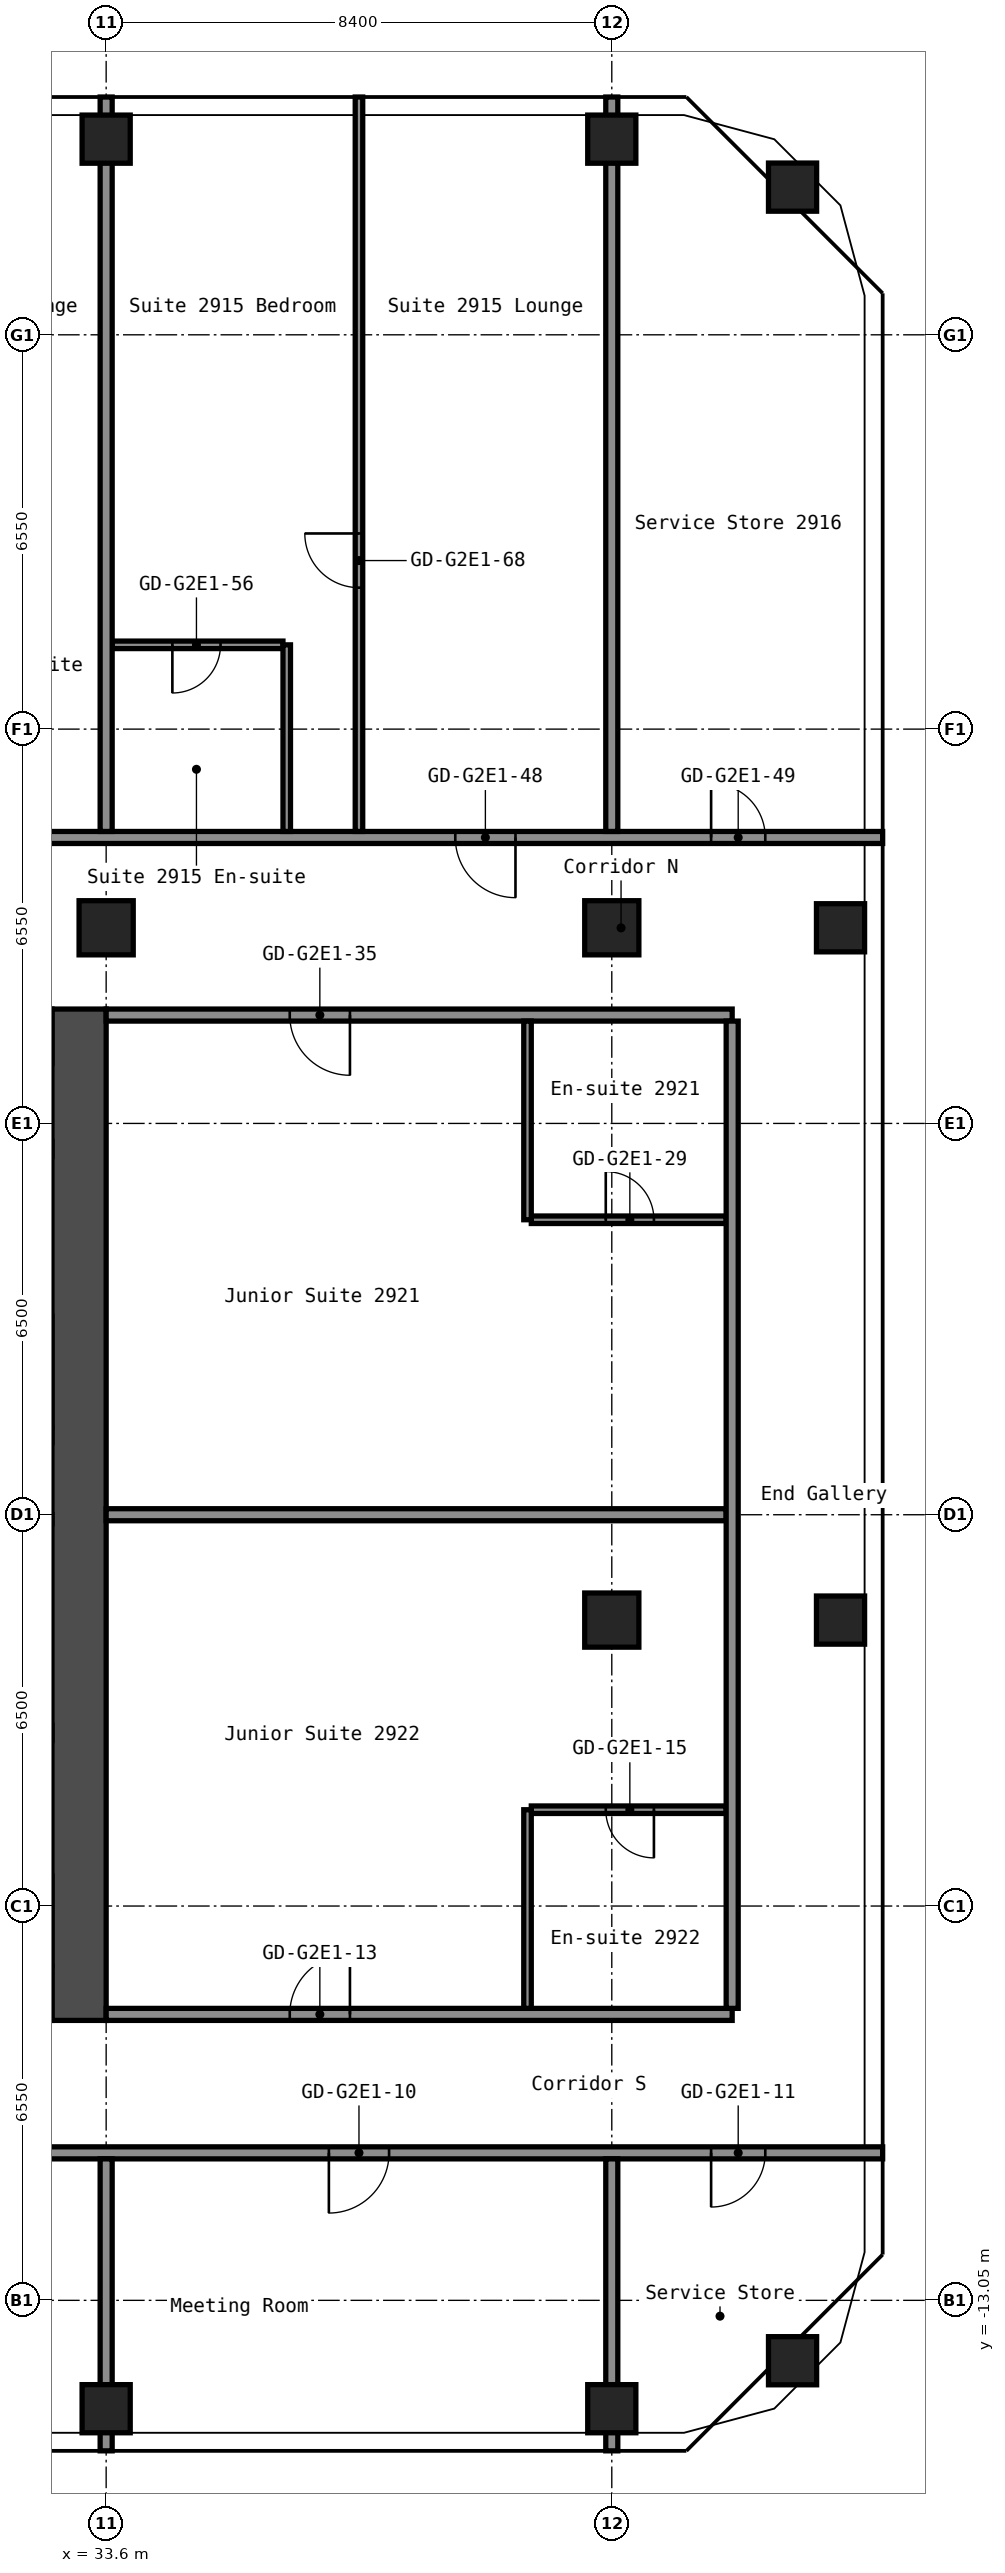
"""IFC4 building model, lengths in metres.
Left out: names, types, materials, properties, quantities, classifications, styles, units other than length and angle.
Written with IfcOpenShell. Run it as: python <this file> out.ifc"""

import sys

from ifc_helpers import new_model, si_unit, direction, frame, frame_2d, origin, origin_2d, place, context, subcontext, project, spatial, rectangle, hollow_rectangle, extrude, element, fill, save


model = new_model("IFC4")
c1 = context("Model", 3, precision=1e-05, world=origin(), true_north=direction((0.0, 1.0)))
c2 = subcontext(c1, "Body", "Model", "MODEL_VIEW")
j1 = project(units=[si_unit("LENGTHUNIT", "METRE"), si_unit("PLANEANGLEUNIT", "RADIAN")], contexts=[c1])
p1 = place(None, origin())
s1 = spatial("IfcSite", under=j1, at=p1, CompositionType="ELEMENT")
p2 = place(p1, origin())
s2 = spatial("IfcBuilding", under=s1, at=p2, CompositionType="ELEMENT")
p3 = place(p2, frame((0.0, 0.0, 104.2)))
s3 = spatial("IfcBuildingStorey", under=s2, at=p3, CompositionType="ELEMENT", Elevation=104.2)
p4 = place(p3, frame((33.6, -14.85, 0.0), z_axis=(0.0, 0.0, 1.0), x_axis=(1.0, 0.0, 0.0)))
e1 = element("IfcColumn", 1, at=p4, inside=s3, PredefinedType="COLUMN", context=c2, shape_type="SweptSolid", body=[
    extrude(hollow_rectangle(XDim=0.8, YDim=0.8, WallThickness=0.032, at=origin_2d()), origin(), (0.0, 0.0, 1.0), 2.8),
])
p5 = place(p3, frame((33.6, 9.75, 0.0), z_axis=(0.0, 0.0, 1.0), x_axis=(1.0, 0.0, 0.0)))
e2 = element("IfcColumn", 2, at=p5, inside=s3, PredefinedType="COLUMN", context=c2, shape_type="SweptSolid", body=[
    extrude(hollow_rectangle(XDim=0.9, YDim=0.9, WallThickness=0.036, at=origin_2d()), origin(), (0.0, 0.0, 1.0), 2.8),
])
for number, where, z_axis, x_axis in (
    (3, (33.6, 22.85, 0.0), (0.0, 0.0, 1.0), (1.0, 0.0, 0.0)),
    (4, (42.0, -14.85, 0.0), (0.0, 0.0, 1.0), (1.0, 0.0, 0.0)),
):
    element("IfcColumn", number, at=place(p3, frame(where, z_axis=z_axis, x_axis=x_axis)), inside=s3, PredefinedType="COLUMN", context=c2, shape_type="SweptSolid", body=[
        extrude(hollow_rectangle(XDim=0.8, YDim=0.8, WallThickness=0.032, at=origin_2d()), origin(), (0.0, 0.0, 1.0), 2.8),
    ])
for number, where, z_axis, x_axis in (
    (5, (42.0, -1.75, 0.0), (0.0, 0.0, 1.0), (1.0, 0.0, 0.0)),
    (6, (42.0, 9.75, 0.0), (0.0, 0.0, 1.0), (1.0, 0.0, 0.0)),
):
    element("IfcColumn", number, at=place(p3, frame(where, z_axis=z_axis, x_axis=x_axis)), inside=s3, PredefinedType="COLUMN", context=c2, shape_type="SweptSolid", body=[
        extrude(hollow_rectangle(XDim=0.9, YDim=0.9, WallThickness=0.036, at=origin_2d()), origin(), (0.0, 0.0, 1.0), 2.8),
    ])
for number, where, z_axis, x_axis in (
    (7, (42.0, 22.85, 0.0), (0.0, 0.0, 1.0), (1.0, 0.0, 0.0)),
    (8, (45.003, -14.053, 0.0), (0.0, 0.0, 1.0), (1.0, 0.0, 0.0)),
    (9, (45.8, -1.75, 0.0), (0.0, 0.0, 1.0), (1.0, 0.0, 0.0)),
    (10, (45.8, 9.75, 0.0), (0.0, 0.0, 1.0), (1.0, 0.0, 0.0)),
    (11, (45.003, 22.053, 0.0), (0.0, 0.0, 1.0), (1.0, 0.0, 0.0)),
):
    element("IfcColumn", number, at=place(p3, frame(where, z_axis=z_axis, x_axis=x_axis)), inside=s3, PredefinedType="COLUMN", context=c2, shape_type="SweptSolid", body=[
        extrude(hollow_rectangle(XDim=0.8, YDim=0.8, WallThickness=0.032, at=origin_2d()), origin(), (0.0, 0.0, 1.0), 2.8),
    ])
p6 = place(p3, frame((33.15, -8.4, 0.0), z_axis=(0.0, 0.0, 1.0), x_axis=(0.0, 1.0, 0.0)))
e12 = element("IfcWall", 12, at=p6, inside=s3, PredefinedType="SHEAR", context=c2, shape_type="SweptSolid", body=[
    extrude(rectangle(XDim=16.8, YDim=0.9, at=frame_2d((8.4, 0.0))), origin(), (0.0, 0.0, 1.0), 2.8),
])
p7 = place(p3, frame((16.8, -10.6, 0.0), z_axis=(0.0, 0.0, 1.0), x_axis=(1.0, 0.0, 0.0)))
e13 = element("IfcWall", 13, at=p7, inside=s3, PredefinedType="PARTITIONING", context=c2, shape_type="SweptSolid", body=[
    extrude(rectangle(XDim=29.7, YDim=0.2, at=frame_2d((14.85, 0.0))), origin(), (0.0, 0.0, 1.0), 2.8),
])
p8 = place(p7, frame((2.07, 0.0, 0.0)))
e14 = element("IfcOpeningElement", 14, at=p8, cuts=e13, PredefinedType="OPENING", context=c2, shape_type="SweptSolid", body=[
    extrude(rectangle(XDim=0.9, YDim=2.1, at=frame_2d((0.45, 1.05))), frame((0.0, 0.11, 0.0), z_axis=(0.0, -1.0, 0.0), x_axis=(1.0, 0.0, 0.0)), (0.0, 0.0, 1.0), 0.22),
])
p9 = place(p7, frame((6.27, 0.0, 0.0)))
e15 = element("IfcOpeningElement", 15, at=p9, cuts=e13, PredefinedType="OPENING", context=c2, shape_type="SweptSolid", body=[
    extrude(rectangle(XDim=0.9, YDim=2.1, at=frame_2d((0.45, 1.05))), frame((0.0, 0.11, 0.0), z_axis=(0.0, -1.0, 0.0), x_axis=(1.0, 0.0, 0.0)), (0.0, 0.0, 1.0), 0.22),
])
p10 = place(p7, frame((12.1, 0.0, 0.0)))
e16 = element("IfcOpeningElement", 16, at=p10, cuts=e13, PredefinedType="OPENING", context=c2, shape_type="SweptSolid", body=[
    extrude(rectangle(XDim=1.0, YDim=2.1, at=frame_2d((0.5, 1.05))), frame((0.0, 0.11, 0.0), z_axis=(0.0, -1.0, 0.0), x_axis=(1.0, 0.0, 0.0)), (0.0, 0.0, 1.0), 0.22),
])
p11 = place(p7, frame((20.5, 0.0, 0.0)))
e17 = element("IfcOpeningElement", 17, at=p11, cuts=e13, PredefinedType="OPENING", context=c2, shape_type="SweptSolid", body=[
    extrude(rectangle(XDim=1.0, YDim=2.1, at=frame_2d((0.5, 1.05))), frame((0.0, 0.11, 0.0), z_axis=(0.0, -1.0, 0.0), x_axis=(1.0, 0.0, 0.0)), (0.0, 0.0, 1.0), 0.22),
])
p12 = place(p7, frame((26.85, 0.0, 0.0)))
e18 = element("IfcOpeningElement", 18, at=p12, cuts=e13, PredefinedType="OPENING", context=c2, shape_type="SweptSolid", body=[
    extrude(rectangle(XDim=0.9, YDim=2.1, at=frame_2d((0.45, 1.05))), frame((0.0, 0.11, 0.0), z_axis=(0.0, -1.0, 0.0), x_axis=(1.0, 0.0, 0.0)), (0.0, 0.0, 1.0), 0.22),
])
p13 = place(p3, frame((33.6, -8.3, 0.0), z_axis=(0.0, 0.0, 1.0), x_axis=(1.0, 0.0, 0.0)))
e19 = element("IfcWall", 19, at=p13, inside=s3, PredefinedType="PARTITIONING", context=c2, shape_type="SweptSolid", body=[
    extrude(rectangle(XDim=10.4, YDim=0.2, at=frame_2d((5.2, 0.0))), origin(), (0.0, 0.0, 1.0), 2.8),
])
p14 = place(p13, frame((3.05, 0.0, 0.0)))
e20 = element("IfcOpeningElement", 20, at=p14, cuts=e19, PredefinedType="OPENING", context=c2, shape_type="SweptSolid", body=[
    extrude(rectangle(XDim=1.0, YDim=2.1, at=frame_2d((0.5, 1.05))), frame((0.0, 0.11, 0.0), z_axis=(0.0, -1.0, 0.0), x_axis=(1.0, 0.0, 0.0)), (0.0, 0.0, 1.0), 0.22),
])
p15 = place(p3, frame((40.663, -4.9, 0.0), z_axis=(0.0, 0.0, 1.0), x_axis=(1.0, 0.0, 0.0)))
e21 = element("IfcWall", 21, at=p15, inside=s3, PredefinedType="PARTITIONING", context=c2, shape_type="SweptSolid", body=[
    extrude(rectangle(XDim=3.237, YDim=0.125, at=frame_2d((1.619, 0.0))), origin(), (0.0, 0.0, 1.0), 2.8),
])
p16 = place(p15, frame((1.238, 0.0, 0.0)))
e22 = element("IfcOpeningElement", 22, at=p16, cuts=e21, PredefinedType="OPENING", context=c2, shape_type="SweptSolid", body=[
    extrude(rectangle(XDim=0.8, YDim=2.1, at=frame_2d((0.4, 1.05))), frame((0.0, 0.073, 0.0), z_axis=(0.0, -1.0, 0.0), x_axis=(1.0, 0.0, 0.0)), (0.0, 0.0, 1.0), 0.145),
])
p17 = place(p3, frame((33.6, 0.0, 0.0), z_axis=(0.0, 0.0, 1.0), x_axis=(1.0, 0.0, 0.0)))
e23 = element("IfcWall", 23, at=p17, inside=s3, PredefinedType="PARTITIONING", context=c2, shape_type="SweptSolid", body=[
    extrude(rectangle(XDim=10.3, YDim=0.2, at=frame_2d((5.15, 0.0))), origin(), (0.0, 0.0, 1.0), 2.8),
])
p18 = place(p3, frame((40.663, 4.9, 0.0), z_axis=(0.0, 0.0, 1.0), x_axis=(1.0, 0.0, 0.0)))
e24 = element("IfcWall", 24, at=p18, inside=s3, PredefinedType="PARTITIONING", context=c2, shape_type="SweptSolid", body=[
    extrude(rectangle(XDim=3.237, YDim=0.125, at=frame_2d((1.619, 0.0))), origin(), (0.0, 0.0, 1.0), 2.8),
])
p19 = place(p18, frame((1.238, 0.0, 0.0)))
e25 = element("IfcOpeningElement", 25, at=p19, cuts=e24, PredefinedType="OPENING", context=c2, shape_type="SweptSolid", body=[
    extrude(rectangle(XDim=0.8, YDim=2.1, at=frame_2d((0.4, 1.05))), frame((0.0, 0.073, 0.0), z_axis=(0.0, -1.0, 0.0), x_axis=(1.0, 0.0, 0.0)), (0.0, 0.0, 1.0), 0.145),
])
p20 = place(p3, frame((33.6, 8.3, 0.0), z_axis=(0.0, 0.0, 1.0), x_axis=(1.0, 0.0, 0.0)))
e26 = element("IfcWall", 26, at=p20, inside=s3, PredefinedType="PARTITIONING", context=c2, shape_type="SweptSolid", body=[
    extrude(rectangle(XDim=10.4, YDim=0.2, at=frame_2d((5.2, 0.0))), origin(), (0.0, 0.0, 1.0), 2.8),
])
p21 = place(p20, frame((3.05, 0.0, 0.0)))
e27 = element("IfcOpeningElement", 27, at=p21, cuts=e26, PredefinedType="OPENING", context=c2, shape_type="SweptSolid", body=[
    extrude(rectangle(XDim=1.0, YDim=2.1, at=frame_2d((0.5, 1.05))), frame((0.0, 0.11, 0.0), z_axis=(0.0, -1.0, 0.0), x_axis=(1.0, 0.0, 0.0)), (0.0, 0.0, 1.0), 0.22),
])
p22 = place(p3, frame((16.8, 11.25, 0.0), z_axis=(0.0, 0.0, 1.0), x_axis=(1.0, 0.0, 0.0)))
e28 = element("IfcWall", 28, at=p22, inside=s3, PredefinedType="PARTITIONING", context=c2, shape_type="SweptSolid", body=[
    extrude(rectangle(XDim=29.7, YDim=0.2, at=frame_2d((14.85, 0.0))), origin(), (0.0, 0.0, 1.0), 2.8),
])
p23 = place(p22, frame((1.6, 0.0, 0.0)))
e29 = element("IfcOpeningElement", 29, at=p23, cuts=e28, PredefinedType="OPENING", context=c2, shape_type="SweptSolid", body=[
    extrude(rectangle(XDim=1.0, YDim=2.1, at=frame_2d((0.5, 1.05))), frame((0.0, 0.11, 0.0), z_axis=(0.0, -1.0, 0.0), x_axis=(1.0, 0.0, 0.0)), (0.0, 0.0, 1.0), 0.22),
])
p24 = place(p22, frame((14.2, 0.0, 0.0)))
e30 = element("IfcOpeningElement", 30, at=p24, cuts=e28, PredefinedType="OPENING", context=c2, shape_type="SweptSolid", body=[
    extrude(rectangle(XDim=1.0, YDim=2.1, at=frame_2d((0.5, 1.05))), frame((0.0, 0.11, 0.0), z_axis=(0.0, -1.0, 0.0), x_axis=(1.0, 0.0, 0.0)), (0.0, 0.0, 1.0), 0.22),
])
p25 = place(p22, frame((22.6, 0.0, 0.0)))
e31 = element("IfcOpeningElement", 31, at=p25, cuts=e28, PredefinedType="OPENING", context=c2, shape_type="SweptSolid", body=[
    extrude(rectangle(XDim=1.0, YDim=2.1, at=frame_2d((0.5, 1.05))), frame((0.0, 0.11, 0.0), z_axis=(0.0, -1.0, 0.0), x_axis=(1.0, 0.0, 0.0)), (0.0, 0.0, 1.0), 0.22),
])
p26 = place(p22, frame((26.85, 0.0, 0.0)))
e32 = element("IfcOpeningElement", 32, at=p26, cuts=e28, PredefinedType="OPENING", context=c2, shape_type="SweptSolid", body=[
    extrude(rectangle(XDim=0.9, YDim=2.1, at=frame_2d((0.45, 1.05))), frame((0.0, 0.11, 0.0), z_axis=(0.0, -1.0, 0.0), x_axis=(1.0, 0.0, 0.0)), (0.0, 0.0, 1.0), 0.22),
])
p27 = place(p3, frame((33.7, 14.45, 0.0), z_axis=(0.0, 0.0, 1.0), x_axis=(1.0, 0.0, 0.0)))
e33 = element("IfcWall", 33, at=p27, inside=s3, PredefinedType="PARTITIONING", context=c2, shape_type="SweptSolid", body=[
    extrude(rectangle(XDim=2.838, YDim=0.125, at=frame_2d((1.419, 0.0))), origin(), (0.0, 0.0, 1.0), 2.8),
])
p28 = place(p27, frame((1.0, 0.0, 0.0)))
e34 = element("IfcOpeningElement", 34, at=p28, cuts=e33, PredefinedType="OPENING", context=c2, shape_type="SweptSolid", body=[
    extrude(rectangle(XDim=0.8, YDim=2.1, at=frame_2d((0.4, 1.05))), frame((0.0, 0.073, 0.0), z_axis=(0.0, -1.0, 0.0), x_axis=(1.0, 0.0, 0.0)), (0.0, 0.0, 1.0), 0.145),
])
p29 = place(p3, frame((33.6, -15.55, 0.0), z_axis=(0.0, 0.0, 1.0), x_axis=(0.0, 1.0, 0.0)))
e35 = element("IfcWall", 35, at=p29, inside=s3, PredefinedType="PARTITIONING", context=c2, shape_type="SweptSolid", body=[
    extrude(rectangle(XDim=4.85, YDim=0.2, at=frame_2d((2.425, 0.0))), origin(), (0.0, 0.0, 1.0), 2.8),
])
p30 = place(p3, frame((33.6, 11.35, 0.0), z_axis=(0.0, 0.0, 1.0), x_axis=(0.0, 1.0, 0.0)))
e36 = element("IfcWall", 36, at=p30, inside=s3, PredefinedType="PARTITIONING", context=c2, shape_type="SweptSolid", body=[
    extrude(rectangle(XDim=12.2, YDim=0.2, at=frame_2d((6.1, 0.0))), origin(), (0.0, 0.0, 1.0), 2.8),
])
p31 = place(p3, frame((36.6, 11.35, 0.0), z_axis=(0.0, 0.0, 1.0), x_axis=(0.0, 1.0, 0.0)))
e37 = element("IfcWall", 37, at=p31, inside=s3, PredefinedType="PARTITIONING", context=c2, shape_type="SweptSolid", body=[
    extrude(rectangle(XDim=3.1, YDim=0.125, at=frame_2d((1.55, 0.0))), origin(), (0.0, 0.0, 1.0), 2.8),
])
p32 = place(p3, frame((37.8, 11.35, 0.0), z_axis=(0.0, 0.0, 1.0), x_axis=(0.0, 1.0, 0.0)))
e38 = element("IfcWall", 38, at=p32, inside=s3, PredefinedType="PARTITIONING", context=c2, shape_type="SweptSolid", body=[
    extrude(rectangle(XDim=12.2, YDim=0.125, at=frame_2d((6.1, 0.0))), origin(), (0.0, 0.0, 1.0), 2.8),
])
p33 = place(p32, frame((4.05, 0.0, 0.0)))
e39 = element("IfcOpeningElement", 39, at=p33, cuts=e38, PredefinedType="OPENING", context=c2, shape_type="SweptSolid", body=[
    extrude(rectangle(XDim=0.9, YDim=2.1, at=frame_2d((0.45, 1.05))), frame((0.0, 0.073, 0.0), z_axis=(0.0, -1.0, 0.0), x_axis=(1.0, 0.0, 0.0)), (0.0, 0.0, 1.0), 0.145),
])
for number, where, z_axis, x_axis in (
    (40, (40.6, -8.2, 0.0), (0.0, 0.0, 1.0), (0.0, 1.0, 0.0)),
    (41, (40.6, 4.9, 0.0), (0.0, 0.0, 1.0), (0.0, 1.0, 0.0)),
):
    element("IfcWall", number, at=place(p3, frame(where, z_axis=z_axis, x_axis=x_axis)), inside=s3, PredefinedType="PARTITIONING", context=c2, shape_type="SweptSolid", body=[
        extrude(rectangle(XDim=3.3, YDim=0.125, at=frame_2d((1.65, 0.0))), origin(), (0.0, 0.0, 1.0), 2.8),
    ])
p34 = place(p3, frame((42.0, -15.55, 0.0), z_axis=(0.0, 0.0, 1.0), x_axis=(0.0, 1.0, 0.0)))
e42 = element("IfcWall", 42, at=p34, inside=s3, PredefinedType="PARTITIONING", context=c2, shape_type="SweptSolid", body=[
    extrude(rectangle(XDim=4.85, YDim=0.2, at=frame_2d((2.425, 0.0))), origin(), (0.0, 0.0, 1.0), 2.8),
])
p35 = place(p3, frame((42.0, 11.35, 0.0), z_axis=(0.0, 0.0, 1.0), x_axis=(0.0, 1.0, 0.0)))
e43 = element("IfcWall", 43, at=p35, inside=s3, PredefinedType="PARTITIONING", context=c2, shape_type="SweptSolid", body=[
    extrude(rectangle(XDim=12.2, YDim=0.2, at=frame_2d((6.1, 0.0))), origin(), (0.0, 0.0, 1.0), 2.8),
])
p36 = place(p3, frame((44.0, -8.2, 0.0), z_axis=(0.0, 0.0, 1.0), x_axis=(0.0, 1.0, 0.0)))
e44 = element("IfcWall", 44, at=p36, inside=s3, PredefinedType="PARTITIONING", context=c2, shape_type="SweptSolid", body=[
    extrude(rectangle(XDim=16.4, YDim=0.2, at=frame_2d((8.2, 0.0))), origin(), (0.0, 0.0, 1.0), 2.8),
])
p37 = place(p11, origin())
e45 = element("IfcDoor", 45, at=p37, inside=s3, OperationType="SINGLE_SWING_LEFT", PredefinedType="DOOR", context=c2, shape_type="SweptSolid", body=[
    extrude(rectangle(XDim=1.0, YDim=2.1, at=frame_2d((0.5, 1.05))), frame((0.0, 0.025, 0.0), z_axis=(0.0, -1.0, 0.0), x_axis=(1.0, 0.0, 0.0)), (0.0, 0.0, 1.0), 0.05),
])
fill(e17, e45)
p38 = place(p12, origin())
e46 = element("IfcDoor", 46, at=p38, inside=s3, OperationType="SINGLE_SWING_LEFT", PredefinedType="DOOR", context=c2, shape_type="SweptSolid", body=[
    extrude(rectangle(XDim=0.9, YDim=2.1, at=frame_2d((0.45, 1.05))), frame((0.0, 0.025, 0.0), z_axis=(0.0, -1.0, 0.0), x_axis=(1.0, 0.0, 0.0)), (0.0, 0.0, 1.0), 0.05),
])
fill(e18, e46)
p39 = place(p14, origin())
e47 = element("IfcDoor", 47, at=p39, inside=s3, OperationType="SINGLE_SWING_LEFT", PredefinedType="DOOR", context=c2, shape_type="SweptSolid", body=[
    extrude(rectangle(XDim=1.0, YDim=2.1, at=frame_2d((0.5, 1.05))), frame((0.0, 0.025, 0.0), z_axis=(0.0, -1.0, 0.0), x_axis=(1.0, 0.0, 0.0)), (0.0, 0.0, 1.0), 0.05),
])
fill(e20, e47)
p40 = place(p16, origin())
e48 = element("IfcDoor", 48, at=p40, inside=s3, OperationType="SINGLE_SWING_RIGHT", PredefinedType="DOOR", context=c2, shape_type="SweptSolid", body=[
    extrude(rectangle(XDim=0.8, YDim=2.1, at=frame_2d((0.4, 1.05))), frame((0.0, 0.025, 0.0), z_axis=(0.0, -1.0, 0.0), x_axis=(1.0, 0.0, 0.0)), (0.0, 0.0, 1.0), 0.05),
])
fill(e22, e48)
p41 = place(p19, origin())
e49 = element("IfcDoor", 49, at=p41, inside=s3, OperationType="SINGLE_SWING_RIGHT", PredefinedType="DOOR", context=c2, shape_type="SweptSolid", body=[
    extrude(rectangle(XDim=0.8, YDim=2.1, at=frame_2d((0.4, 1.05))), frame((0.0, 0.025, 0.0), z_axis=(0.0, -1.0, 0.0), x_axis=(1.0, 0.0, 0.0)), (0.0, 0.0, 1.0), 0.05),
])
fill(e25, e49)
p42 = place(p21, origin())
e50 = element("IfcDoor", 50, at=p42, inside=s3, OperationType="SINGLE_SWING_RIGHT", PredefinedType="DOOR", context=c2, shape_type="SweptSolid", body=[
    extrude(rectangle(XDim=1.0, YDim=2.1, at=frame_2d((0.5, 1.05))), frame((0.0, 0.025, 0.0), z_axis=(0.0, -1.0, 0.0), x_axis=(1.0, 0.0, 0.0)), (0.0, 0.0, 1.0), 0.05),
])
fill(e27, e50)
p43 = place(p25, origin())
e51 = element("IfcDoor", 51, at=p43, inside=s3, OperationType="SINGLE_SWING_RIGHT", PredefinedType="DOOR", context=c2, shape_type="SweptSolid", body=[
    extrude(rectangle(XDim=1.0, YDim=2.1, at=frame_2d((0.5, 1.05))), frame((0.0, 0.025, 0.0), z_axis=(0.0, -1.0, 0.0), x_axis=(1.0, 0.0, 0.0)), (0.0, 0.0, 1.0), 0.05),
])
fill(e31, e51)
p44 = place(p26, origin())
e52 = element("IfcDoor", 52, at=p44, inside=s3, OperationType="SINGLE_SWING_RIGHT", PredefinedType="DOOR", context=c2, shape_type="SweptSolid", body=[
    extrude(rectangle(XDim=0.9, YDim=2.1, at=frame_2d((0.45, 1.05))), frame((0.0, 0.025, 0.0), z_axis=(0.0, -1.0, 0.0), x_axis=(1.0, 0.0, 0.0)), (0.0, 0.0, 1.0), 0.05),
])
fill(e32, e52)
p45 = place(p28, origin())
e53 = element("IfcDoor", 53, at=p45, inside=s3, OperationType="SINGLE_SWING_LEFT", PredefinedType="DOOR", context=c2, shape_type="SweptSolid", body=[
    extrude(rectangle(XDim=0.8, YDim=2.1, at=frame_2d((0.4, 1.05))), frame((0.0, 0.025, 0.0), z_axis=(0.0, -1.0, 0.0), x_axis=(1.0, 0.0, 0.0)), (0.0, 0.0, 1.0), 0.05),
])
fill(e34, e53)
p46 = place(p33, origin())
e54 = element("IfcDoor", 54, at=p46, inside=s3, OperationType="SINGLE_SWING_LEFT", PredefinedType="DOOR", context=c2, shape_type="SweptSolid", body=[
    extrude(rectangle(XDim=0.9, YDim=2.1, at=frame_2d((0.45, 1.05))), frame((0.0, 0.025, 0.0), z_axis=(0.0, -1.0, 0.0), x_axis=(1.0, 0.0, 0.0)), (0.0, 0.0, 1.0), 0.05),
])
fill(e39, e54)
save(model, sys.argv[1])
